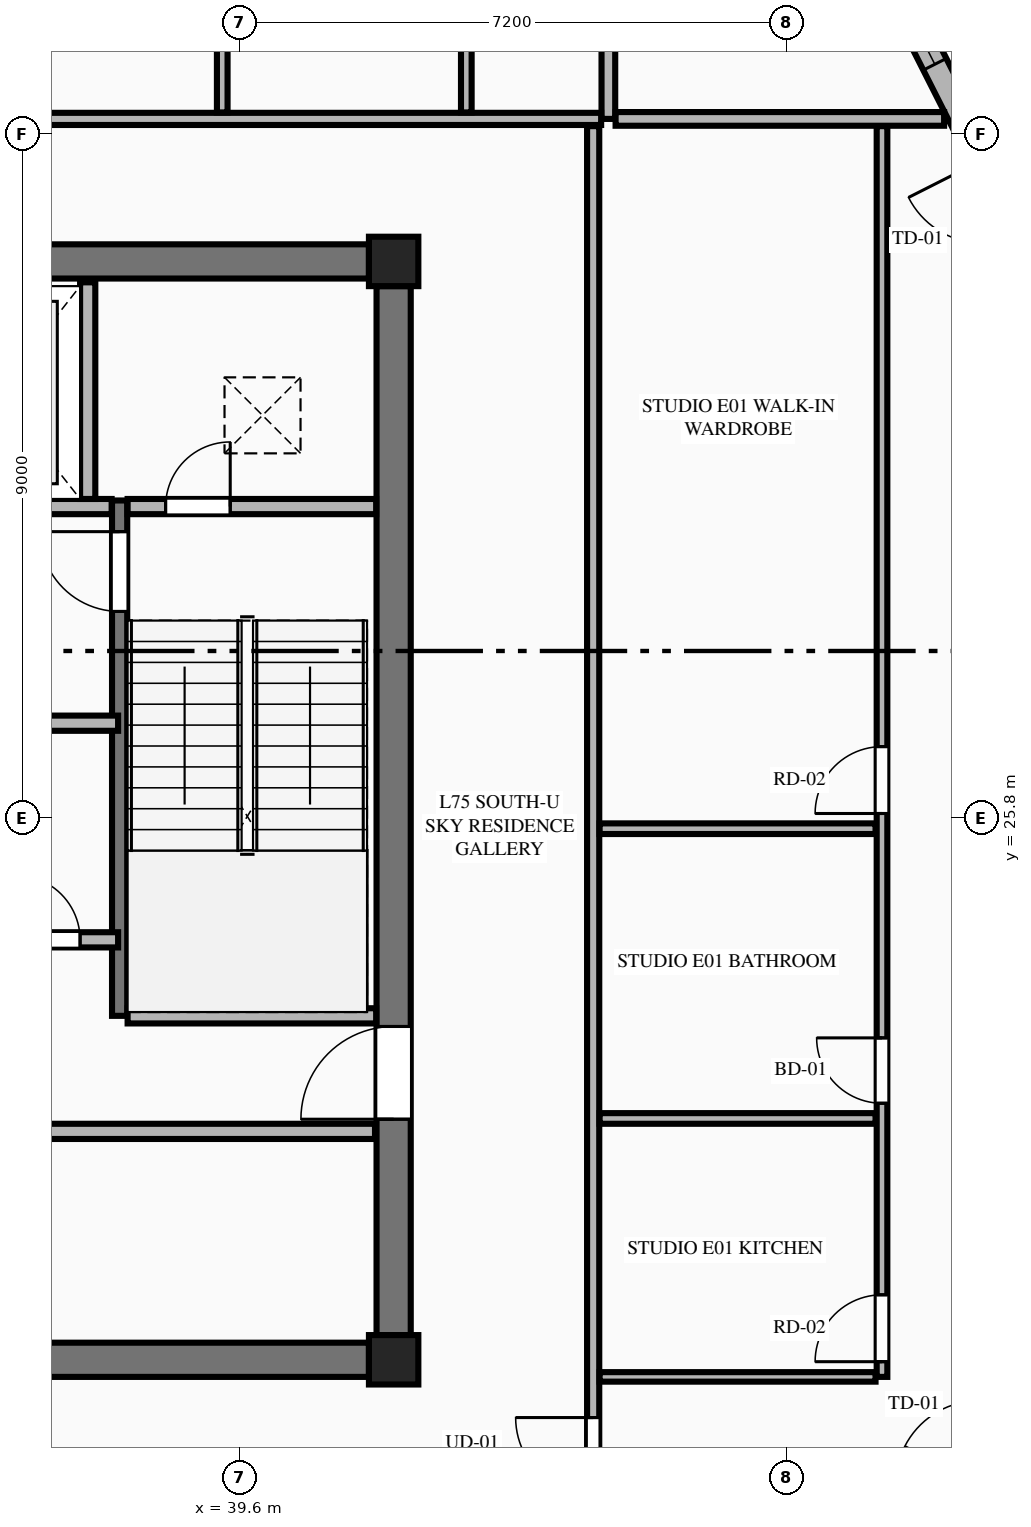
"""IFC4 building model, lengths in metres.
Left out: names, types, materials, properties, quantities, classifications, styles, units other than length and angle.
Written with IfcOpenShell. Run it as: python <this file> out.ifc"""

import sys

from ifc_helpers import new_model, si_unit, direction, frame, frame_2d, origin, origin_2d, place, context, subcontext, project, spatial, rectangle, extrude, element, fill, save


model = new_model("IFC4")
c1 = context("Model", 3, precision=1e-05, world=origin(), true_north=direction((0.0, 1.0)))
c2 = subcontext(c1, "Body", "Model", "MODEL_VIEW")
j1 = project(units=[si_unit("LENGTHUNIT", "METRE"), si_unit("PLANEANGLEUNIT", "RADIAN")], contexts=[c1])
p1 = place(None, origin())
s1 = spatial("IfcSite", under=j1, at=p1, CompositionType="ELEMENT")
p2 = place(p1, origin())
s2 = spatial("IfcBuilding", under=s1, at=p2, CompositionType="ELEMENT")
p3 = place(p2, frame((0.0, 0.0, 283.5)))
s3 = spatial("IfcBuildingStorey", under=s2, at=p3, CompositionType="ELEMENT", Elevation=283.5)
for number, where, z_axis, x_axis in (
    (1, (41.625, 18.675, 0.0), (0.0, 0.0, 1.0), (1.0, 0.0, 0.0)),
    (2, (41.625, 33.125, 0.0), (0.0, 0.0, 1.0), (1.0, 0.0, 0.0)),
):
    element("IfcColumn", number, at=place(p3, frame(where, z_axis=z_axis, x_axis=x_axis)), inside=s3, PredefinedType="COLUMN", context=c2, shape_type="SweptSolid", body=[
        extrude(rectangle(XDim=0.65, YDim=0.65, at=origin_2d()), origin(), (0.0, 0.0, 1.0), 4.0),
    ])
for number, where, z_axis, x_axis in (
    (3, (23.5, 18.675, 0.0), (0.0, 0.0, 1.0), (1.0, 0.0, 0.0)),
    (4, (23.5, 33.125, 0.0), (0.0, 0.0, 1.0), (1.0, 0.0, 0.0)),
):
    element("IfcWall", number, at=place(p3, frame(where, z_axis=z_axis, x_axis=x_axis)), inside=s3, PredefinedType="SHEAR", context=c2, shape_type="SweptSolid", body=[
        extrude(rectangle(XDim=17.8, YDim=0.45, at=frame_2d((8.9, 0.0))), origin(), (0.0, 0.0, 1.0), 3.8),
    ])
p4 = place(p3, frame((41.625, 19.0, 0.0), z_axis=(0.0, 0.0, 1.0), x_axis=(0.0, 1.0, 0.0)))
e5 = element("IfcWall", 5, at=p4, inside=s3, PredefinedType="SHEAR", context=c2, shape_type="SweptSolid", body=[
    extrude(rectangle(XDim=13.8, YDim=0.45, at=frame_2d((6.9, 0.0))), origin(), (0.0, 0.0, 1.0), 3.8),
])
p5 = place(p4, frame((2.84, 0.0, 0.0)))
e6 = element("IfcOpeningElement", 6, at=p5, cuts=e5, PredefinedType="OPENING", context=c2, shape_type="SweptSolid", body=[
    extrude(rectangle(XDim=1.22, YDim=2.25, at=frame_2d((0.61, 1.125))), frame((0.0, 0.235, 0.0), z_axis=(0.0, -1.0, 0.0), x_axis=(1.0, 0.0, 0.0)), (0.0, 0.0, 1.0), 0.47),
])
p6 = place(p3, frame((38.02, 23.2, 0.0), z_axis=(0.0, 0.0, 1.0), x_axis=(0.0, 1.0, 0.0)))
e7 = element("IfcWall", 7, at=p6, inside=s3, PredefinedType="SHEAR", context=c2, shape_type="SweptSolid", body=[
    extrude(rectangle(XDim=6.78, YDim=0.2, at=frame_2d((3.39, 0.0))), origin(), (0.0, 0.0, 1.0), 4.0),
])
p7 = place(p6, frame((5.32, 0.0, 0.0)))
e8 = element("IfcOpeningElement", 8, at=p7, cuts=e7, PredefinedType="OPENING", context=c2, shape_type="SweptSolid", body=[
    extrude(rectangle(XDim=1.05, YDim=2.15, at=frame_2d((0.525, 1.075))), frame((0.0, 0.11, 0.0), z_axis=(0.0, -1.0, 0.0), x_axis=(1.0, 0.0, 0.0)), (0.0, 0.0, 1.0), 0.22),
])
p8 = place(p3, frame((38.125, 23.2, 0.0), z_axis=(0.0, 0.0, 1.0), x_axis=(1.0, 0.0, 0.0)))
e9 = element("IfcWall", 9, at=p8, inside=s3, PredefinedType="PLUMBINGWALL", context=c2, shape_type="SweptSolid", body=[
    extrude(rectangle(XDim=3.27, YDim=0.2, at=frame_2d((1.635, 0.0))), origin(), (0.0, 0.0, 1.0), 3.8),
])
p9 = place(p3, frame((34.9, 29.9, 0.0), z_axis=(0.0, 0.0, 1.0), x_axis=(1.0, 0.0, 0.0)))
e10 = element("IfcWall", 10, at=p9, inside=s3, PredefinedType="PLUMBINGWALL", context=c2, shape_type="SweptSolid", body=[
    extrude(rectangle(XDim=3.015, YDim=0.2, at=frame_2d((1.508, 0.0))), origin(), (0.0, 0.0, 1.0), 3.8),
])
p10 = place(p9, frame((0.725, 0.0, 0.0)))
e11 = element("IfcOpeningElement", 11, at=p10, cuts=e10, PredefinedType="OPENING", context=c2, shape_type="SweptSolid", body=[
    extrude(rectangle(XDim=1.15, YDim=2.2, at=frame_2d((0.575, 1.1))), frame((0.0, 0.11, 0.0), z_axis=(0.0, -1.0, 0.0), x_axis=(1.0, 0.0, 0.0)), (0.0, 0.0, 1.0), 0.22),
])
p11 = place(p3, frame((38.125, 29.9, 0.0), z_axis=(0.0, 0.0, 1.0), x_axis=(1.0, 0.0, 0.0)))
e12 = element("IfcWall", 12, at=p11, inside=s3, PredefinedType="PLUMBINGWALL", context=c2, shape_type="SweptSolid", body=[
    extrude(rectangle(XDim=3.27, YDim=0.2, at=frame_2d((1.635, 0.0))), origin(), (0.0, 0.0, 1.0), 3.8),
])
p12 = place(p11, frame((0.5, 0.0, 0.0)))
e13 = element("IfcOpeningElement", 13, at=p12, cuts=e12, PredefinedType="OPENING", context=c2, shape_type="SweptSolid", body=[
    extrude(rectangle(XDim=0.85, YDim=2.05, at=frame_2d((0.425, 1.025))), frame((0.0, 0.11, 0.0), z_axis=(0.0, -1.0, 0.0), x_axis=(1.0, 0.0, 0.0)), (0.0, 0.0, 1.0), 0.22),
])
p13 = place(p3, frame((37.6, 30.0, 0.0), z_axis=(0.0, 0.0, 1.0), x_axis=(0.0, 1.0, 0.0)))
e14 = element("IfcWall", 14, at=p13, inside=s3, PredefinedType="PLUMBINGWALL", context=c2, shape_type="SweptSolid", body=[
    extrude(rectangle(XDim=2.85, YDim=0.2, at=frame_2d((1.425, 0.0))), origin(), (0.0, 0.0, 1.0), 3.8),
])
p14 = place(p3, frame((34.8, 27.05, 0.0), z_axis=(0.0, 0.0, 1.0), x_axis=(1.0, 0.0, 0.0)))
e15 = element("IfcWall", 15, at=p14, inside=s3, PredefinedType="PLUMBINGWALL", context=c2, shape_type="SweptSolid", body=[
    extrude(rectangle(XDim=3.2, YDim=0.2, at=frame_2d((1.6, 0.0))), origin(), (0.0, 0.0, 1.0), 3.8),
])
p15 = place(p3, frame((31.2, 24.2, 0.0), z_axis=(0.0, 0.0, 1.0), x_axis=(1.0, 0.0, 0.0)))
e16 = element("IfcWall", 16, at=p15, inside=s3, PredefinedType="PLUMBINGWALL", context=c2, shape_type="SweptSolid", body=[
    extrude(rectangle(XDim=6.8, YDim=0.2, at=frame_2d((3.4, 0.0))), origin(), (0.0, 0.0, 1.0), 3.8),
])
p16 = place(p15, frame((0.65, 0.0, 0.0)))
e17 = element("IfcOpeningElement", 17, at=p16, cuts=e16, PredefinedType="OPENING", context=c2, shape_type="SweptSolid", body=[
    extrude(rectangle(XDim=1.1, YDim=2.2, at=frame_2d((0.55, 1.1))), frame((0.0, 0.11, 0.0), z_axis=(0.0, -1.0, 0.0), x_axis=(1.0, 0.0, 0.0)), (0.0, 0.0, 1.0), 0.22),
])
p17 = place(p15, frame((2.55, 0.0, 0.0)))
e18 = element("IfcOpeningElement", 18, at=p17, cuts=e16, PredefinedType="OPENING", context=c2, shape_type="SweptSolid", body=[
    extrude(rectangle(XDim=0.85, YDim=2.05, at=frame_2d((0.425, 1.025))), frame((0.0, 0.11, 0.0), z_axis=(0.0, -1.0, 0.0), x_axis=(1.0, 0.0, 0.0)), (0.0, 0.0, 1.0), 0.22),
])
p18 = place(p15, frame((4.0, 0.0, 0.0)))
e19 = element("IfcOpeningElement", 19, at=p18, cuts=e16, PredefinedType="OPENING", context=c2, shape_type="SweptSolid", body=[
    extrude(rectangle(XDim=0.85, YDim=2.05, at=frame_2d((0.425, 1.025))), frame((0.0, 0.11, 0.0), z_axis=(0.0, -1.0, 0.0), x_axis=(1.0, 0.0, 0.0)), (0.0, 0.0, 1.0), 0.22),
])
p19 = place(p15, frame((5.45, 0.0, 0.0)))
e20 = element("IfcOpeningElement", 20, at=p19, cuts=e16, PredefinedType="OPENING", context=c2, shape_type="SweptSolid", body=[
    extrude(rectangle(XDim=0.85, YDim=2.05, at=frame_2d((0.425, 1.025))), frame((0.0, 0.11, 0.0), z_axis=(0.0, -1.0, 0.0), x_axis=(1.0, 0.0, 0.0)), (0.0, 0.0, 1.0), 0.22),
])
p20 = place(p3, frame((23.42, 21.68, 0.0), z_axis=(0.0, 0.0, 1.0), x_axis=(1.0, 0.0, 0.0)))
e21 = element("IfcWall", 21, at=p20, inside=s3, PredefinedType="PLUMBINGWALL", context=c2, shape_type="SweptSolid", body=[
    extrude(rectangle(XDim=17.96, YDim=0.2, at=frame_2d((8.98, 0.0))), origin(), (0.0, 0.0, 1.0), 3.8),
])
p21 = place(p20, frame((0.46, 0.0, 0.0)))
e22 = element("IfcOpeningElement", 22, at=p21, cuts=e21, PredefinedType="OPENING", context=c2, shape_type="SweptSolid", body=[
    extrude(rectangle(XDim=0.92, YDim=2.15, at=frame_2d((0.46, 1.075))), frame((0.0, 0.11, 0.0), z_axis=(0.0, -1.0, 0.0), x_axis=(1.0, 0.0, 0.0)), (0.0, 0.0, 1.0), 0.22),
])
p22 = place(p20, frame((9.48, 0.0, 0.0)))
e23 = element("IfcOpeningElement", 23, at=p22, cuts=e21, PredefinedType="OPENING", context=c2, shape_type="SweptSolid", body=[
    extrude(rectangle(XDim=0.92, YDim=2.15, at=frame_2d((0.46, 1.075))), frame((0.0, 0.11, 0.0), z_axis=(0.0, -1.0, 0.0), x_axis=(1.0, 0.0, 0.0)), (0.0, 0.0, 1.0), 0.22),
])
p23 = place(p3, frame((48.002, 14.413, 0.0), z_axis=(0.0, 0.0, 1.0), x_axis=(0.451468341582, 0.892287137949, 0.0)))
e24 = element("IfcWall", 24, at=p23, inside=s3, PredefinedType="STANDARD", context=c2, shape_type="SweptSolid", body=[
    extrude(rectangle(XDim=4.723, YDim=0.34, at=frame_2d((2.361, 0.0))), origin(), (0.0, 0.0, 1.0), 2.99),
])
p24 = place(p23, frame((2.941, 0.0, 0.0)))
e25 = element("IfcOpeningElement", 25, at=p24, cuts=e24, PredefinedType="OPENING", context=c2, shape_type="SweptSolid", body=[
    extrude(rectangle(XDim=1.1, YDim=2.25, at=frame_2d((0.55, 1.125))), frame((0.0, 0.18, 0.0), z_axis=(0.0, -1.0, 0.0), x_axis=(1.0, 0.0, 0.0)), (0.0, 0.0, 1.0), 0.36),
])
p25 = place(p23, frame((0.434, 0.0, 0.75)))
e26 = element("IfcOpeningElement", 26, at=p25, cuts=e24, PredefinedType="OPENING", context=c2, shape_type="SweptSolid", body=[
    extrude(rectangle(XDim=1.1, YDim=2.0, at=frame_2d((0.55, 1.0))), frame((0.0, 0.18, 0.0), z_axis=(0.0, -1.0, 0.0), x_axis=(1.0, 0.0, 0.0)), (0.0, 0.0, 1.0), 0.36),
])
p26 = place(p3, frame((50.134, 32.973, 0.0), z_axis=(0.0, 0.0, 1.0), x_axis=(-0.451447516904, 0.892297674255, 0.0)))
e27 = element("IfcWall", 27, at=p26, inside=s3, PredefinedType="STANDARD", context=c2, shape_type="SweptSolid", body=[
    extrude(rectangle(XDim=4.723, YDim=0.34, at=frame_2d((2.361, 0.0))), origin(), (0.0, 0.0, 1.0), 2.99),
])
p27 = place(p26, frame((0.57, 0.0, 0.0)))
e28 = element("IfcOpeningElement", 28, at=p27, cuts=e27, PredefinedType="OPENING", context=c2, shape_type="SweptSolid", body=[
    extrude(rectangle(XDim=1.1, YDim=2.25, at=frame_2d((0.55, 1.125))), frame((0.0, 0.18, 0.0), z_axis=(0.0, -1.0, 0.0), x_axis=(1.0, 0.0, 0.0)), (0.0, 0.0, 1.0), 0.36),
])
p28 = place(p26, frame((3.077, 0.0, 0.75)))
e29 = element("IfcOpeningElement", 29, at=p28, cuts=e27, PredefinedType="OPENING", context=c2, shape_type="SweptSolid", body=[
    extrude(rectangle(XDim=1.1, YDim=2.0, at=frame_2d((0.55, 1.0))), frame((0.0, 0.18, 0.0), z_axis=(0.0, -1.0, 0.0), x_axis=(1.0, 0.0, 0.0)), (0.0, 0.0, 1.0), 0.36),
])
p29 = place(p3, frame((44.45, 35.0, 0.0), z_axis=(0.0, 0.0, 1.0), x_axis=(0.0, 1.0, 0.0)))
e30 = element("IfcWall", 30, at=p29, inside=s3, PredefinedType="PARTITIONING", context=c2, shape_type="SweptSolid", body=[
    extrude(rectangle(XDim=8.481, YDim=0.18, at=frame_2d((4.24, 0.0))), origin(), (0.0, 0.0, 1.0), 3.8),
])
p30 = place(p3, frame((20.445, 35.0, 0.0), z_axis=(0.0, 0.0, 1.0), x_axis=(1.0, 0.0, 0.0)))
e31 = element("IfcWall", 31, at=p30, inside=s3, PredefinedType="PARTITIONING", context=c2, shape_type="SweptSolid", body=[
    extrude(rectangle(XDim=23.91, YDim=0.16, at=frame_2d((11.955, 0.0))), origin(), (0.0, 0.0, 1.0), 3.8),
])
p31 = place(p30, frame((0.405, 0.0, 0.0)))
e32 = element("IfcOpeningElement", 32, at=p31, cuts=e31, PredefinedType="OPENING", context=c2, shape_type="SweptSolid", body=[
    extrude(rectangle(XDim=1.35, YDim=2.35, at=frame_2d((0.675, 1.175))), frame((0.0, 0.09, 0.0), z_axis=(0.0, -1.0, 0.0), x_axis=(1.0, 0.0, 0.0)), (0.0, 0.0, 1.0), 0.18),
])
p32 = place(p3, frame((39.37, 35.085, 0.0), z_axis=(0.0, 0.0, 1.0), x_axis=(0.0, 1.0, 0.0)))
e33 = element("IfcWall", 33, at=p32, inside=s3, PredefinedType="PLUMBINGWALL", context=c2, shape_type="SweptSolid", body=[
    extrude(rectangle(XDim=4.268, YDim=0.14, at=frame_2d((2.134, 0.0))), origin(), (0.0, 0.0, 1.0), 3.8),
])
p33 = place(p3, frame((42.581, 35.085, 0.0), z_axis=(0.0, 0.0, 1.0), x_axis=(0.0, 1.0, 0.0)))
e34 = element("IfcWall", 34, at=p33, inside=s3, PredefinedType="PLUMBINGWALL", context=c2, shape_type="SweptSolid", body=[
    extrude(rectangle(XDim=4.288, YDim=0.14, at=frame_2d((2.144, 0.0))), origin(), (0.0, 0.0, 1.0), 3.8),
])
p34 = place(p3, frame((44.545, 35.0, 0.0), z_axis=(0.0, 0.0, 1.0), x_axis=(1.0, 0.0, 0.0)))
e35 = element("IfcWall", 35, at=p34, inside=s3, PredefinedType="PARTITIONING", context=c2, shape_type="SweptSolid", body=[
    extrude(rectangle(XDim=4.322, YDim=0.18, at=frame_2d((2.161, 0.0))), origin(), (0.0, 0.0, 1.0), 3.8),
])
p35 = place(p3, frame((44.25, 16.495, 0.0), z_axis=(0.0, 0.0, 1.0), x_axis=(0.0, 1.0, 0.0)))
e36 = element("IfcWall", 36, at=p35, inside=s3, PredefinedType="PARTITIONING", context=c2, shape_type="SweptSolid", body=[
    extrude(rectangle(XDim=18.41, YDim=0.16, at=frame_2d((9.205, 0.0))), origin(), (0.0, 0.0, 1.0), 3.487),
])
p36 = place(p35, frame((0.4, 0.0, 0.0)))
e37 = element("IfcOpeningElement", 37, at=p36, cuts=e36, PredefinedType="OPENING", context=c2, shape_type="SweptSolid", body=[
    extrude(rectangle(XDim=1.02, YDim=2.25, at=frame_2d((0.51, 1.125))), frame((0.0, 0.09, 0.0), z_axis=(0.0, -1.0, 0.0), x_axis=(1.0, 0.0, 0.0)), (0.0, 0.0, 1.0), 0.18),
])
p37 = place(p3, frame((44.335, 18.45, 0.0), z_axis=(0.0, 0.0, 1.0), x_axis=(1.0, 0.0, 0.0)))
e38 = element("IfcWall", 38, at=p37, inside=s3, PredefinedType="PARTITIONING", context=c2, shape_type="SweptSolid", body=[
    extrude(rectangle(XDim=3.63, YDim=0.125, at=frame_2d((1.815, 0.0))), origin(), (0.0, 0.0, 1.0), 3.8),
])
p38 = place(p3, frame((48.05, 18.45, 0.0), z_axis=(0.0, 0.0, 1.0), x_axis=(0.0, 1.0, 0.0)))
e39 = element("IfcWall", 39, at=p38, inside=s3, PredefinedType="PLUMBINGWALL", context=c2, shape_type="SweptSolid", body=[
    extrude(rectangle(XDim=16.455, YDim=0.14, at=frame_2d((8.228, 0.0))), origin(), (0.0, 0.0, 1.0), 3.8),
])
p39 = place(p38, frame((3.6, 0.0, 0.0)))
e40 = element("IfcOpeningElement", 40, at=p39, cuts=e39, PredefinedType="OPENING", context=c2, shape_type="SweptSolid", body=[
    extrude(rectangle(XDim=0.86, YDim=2.1, at=frame_2d((0.43, 1.05))), frame((0.0, 0.08, 0.0), z_axis=(0.0, -1.0, 0.0), x_axis=(1.0, 0.0, 0.0)), (0.0, 0.0, 1.0), 0.16),
])
p40 = place(p38, frame((7.412, 0.0, 0.0)))
e41 = element("IfcOpeningElement", 41, at=p40, cuts=e39, PredefinedType="OPENING", context=c2, shape_type="SweptSolid", body=[
    extrude(rectangle(XDim=0.88, YDim=2.15, at=frame_2d((0.44, 1.075))), frame((0.0, 0.08, 0.0), z_axis=(0.0, -1.0, 0.0), x_axis=(1.0, 0.0, 0.0)), (0.0, 0.0, 1.0), 0.16),
])
p41 = place(p38, frame((0.2, 0.0, 0.0)))
e42 = element("IfcOpeningElement", 42, at=p41, cuts=e39, PredefinedType="OPENING", context=c2, shape_type="SweptSolid", body=[
    extrude(rectangle(XDim=0.88, YDim=2.15, at=frame_2d((0.44, 1.075))), frame((0.0, 0.08, 0.0), z_axis=(0.0, -1.0, 0.0), x_axis=(1.0, 0.0, 0.0)), (0.0, 0.0, 1.0), 0.16),
])
for number, where, z_axis, x_axis in (
    (43, (44.335, 21.85, 0.0), (0.0, 0.0, 1.0), (1.0, 0.0, 0.0)),
    (44, (44.335, 25.662, 0.0), (0.0, 0.0, 1.0), (1.0, 0.0, 0.0)),
):
    element("IfcWall", number, at=place(p3, frame(where, z_axis=z_axis, x_axis=x_axis)), inside=s3, PredefinedType="PLUMBINGWALL", context=c2, shape_type="SweptSolid", body=[
        extrude(rectangle(XDim=3.63, YDim=0.14, at=frame_2d((1.815, 0.0))), origin(), (0.0, 0.0, 1.0), 3.8),
    ])
p42 = place(p5, origin())
e45 = element("IfcDoor", 45, at=p42, inside=s3, OperationType="SINGLE_SWING_LEFT", PredefinedType="DOOR", context=c2, shape_type="SweptSolid", body=[
    extrude(rectangle(XDim=1.22, YDim=2.25, at=frame_2d((0.61, 1.125))), frame((0.0, 0.025, 0.0), z_axis=(0.0, -1.0, 0.0), x_axis=(1.0, 0.0, 0.0)), (0.0, 0.0, 1.0), 0.05),
])
fill(e6, e45)
p43 = place(p7, origin())
e46 = element("IfcDoor", 46, at=p43, inside=s3, OperationType="SINGLE_SWING_RIGHT", PredefinedType="DOOR", context=c2, shape_type="SweptSolid", body=[
    extrude(rectangle(XDim=1.05, YDim=2.15, at=frame_2d((0.525, 1.075))), frame((0.0, 0.025, 0.0), z_axis=(0.0, -1.0, 0.0), x_axis=(1.0, 0.0, 0.0)), (0.0, 0.0, 1.0), 0.05),
])
fill(e8, e46)
p44 = place(p12, origin())
e47 = element("IfcDoor", 47, at=p44, inside=s3, OperationType="SINGLE_SWING_RIGHT", PredefinedType="DOOR", context=c2, shape_type="SweptSolid", body=[
    extrude(rectangle(XDim=0.85, YDim=2.05, at=frame_2d((0.425, 1.025))), frame((0.0, 0.025, 0.0), z_axis=(0.0, -1.0, 0.0), x_axis=(1.0, 0.0, 0.0)), (0.0, 0.0, 1.0), 0.05),
])
fill(e13, e47)
p45 = place(p19, origin())
e48 = element("IfcDoor", 48, at=p45, inside=s3, OperationType="SINGLE_SWING_LEFT", PredefinedType="DOOR", context=c2, shape_type="SweptSolid", body=[
    extrude(rectangle(XDim=0.85, YDim=2.05, at=frame_2d((0.425, 1.025))), frame((0.0, 0.025, 0.0), z_axis=(0.0, -1.0, 0.0), x_axis=(1.0, 0.0, 0.0)), (0.0, 0.0, 1.0), 0.05),
])
fill(e20, e48)
p46 = place(p39, origin())
e49 = element("IfcDoor", 49, at=p46, inside=s3, OperationType="SINGLE_SWING_RIGHT", PredefinedType="DOOR", context=c2, shape_type="SweptSolid", body=[
    extrude(rectangle(XDim=0.86, YDim=2.1, at=frame_2d((0.43, 1.05))), frame((0.0, 0.025, 0.0), z_axis=(0.0, -1.0, 0.0), x_axis=(1.0, 0.0, 0.0)), (0.0, 0.0, 1.0), 0.05),
])
fill(e40, e49)
p47 = place(p40, origin())
e50 = element("IfcDoor", 50, at=p47, inside=s3, OperationType="SINGLE_SWING_LEFT", PredefinedType="DOOR", context=c2, shape_type="SweptSolid", body=[
    extrude(rectangle(XDim=0.88, YDim=2.15, at=frame_2d((0.44, 1.075))), frame((0.0, 0.025, 0.0), z_axis=(0.0, -1.0, 0.0), x_axis=(1.0, 0.0, 0.0)), (0.0, 0.0, 1.0), 0.05),
])
fill(e41, e50)
p48 = place(p36, origin())
e51 = element("IfcDoor", 51, at=p48, inside=s3, OperationType="SINGLE_SWING_RIGHT", PredefinedType="DOOR", context=c2, shape_type="SweptSolid", body=[
    extrude(rectangle(XDim=1.02, YDim=2.25, at=frame_2d((0.51, 1.125))), frame((0.0, 0.025, 0.0), z_axis=(0.0, -1.0, 0.0), x_axis=(1.0, 0.0, 0.0)), (0.0, 0.0, 1.0), 0.05),
])
fill(e37, e51)
p49 = place(p41, origin())
e52 = element("IfcDoor", 52, at=p49, inside=s3, OperationType="SINGLE_SWING_LEFT", PredefinedType="DOOR", context=c2, shape_type="SweptSolid", body=[
    extrude(rectangle(XDim=0.88, YDim=2.15, at=frame_2d((0.44, 1.075))), frame((0.0, 0.025, 0.0), z_axis=(0.0, -1.0, 0.0), x_axis=(1.0, 0.0, 0.0)), (0.0, 0.0, 1.0), 0.05),
])
fill(e42, e52)
p50 = place(p28, origin())
e53 = element("IfcWindow", 53, at=p50, inside=s3, PartitioningType="SINGLE_PANEL", PredefinedType="WINDOW", context=c2, shape_type="SweptSolid", body=[
    extrude(rectangle(XDim=1.1, YDim=2.0, at=frame_2d((0.55, 1.0))), frame((0.0, 0.03, 0.0), z_axis=(0.0, -1.0, 0.0), x_axis=(1.0, 0.0, 0.0)), (0.0, 0.0, 1.0), 0.06),
])
fill(e29, e53)
save(model, sys.argv[1])
